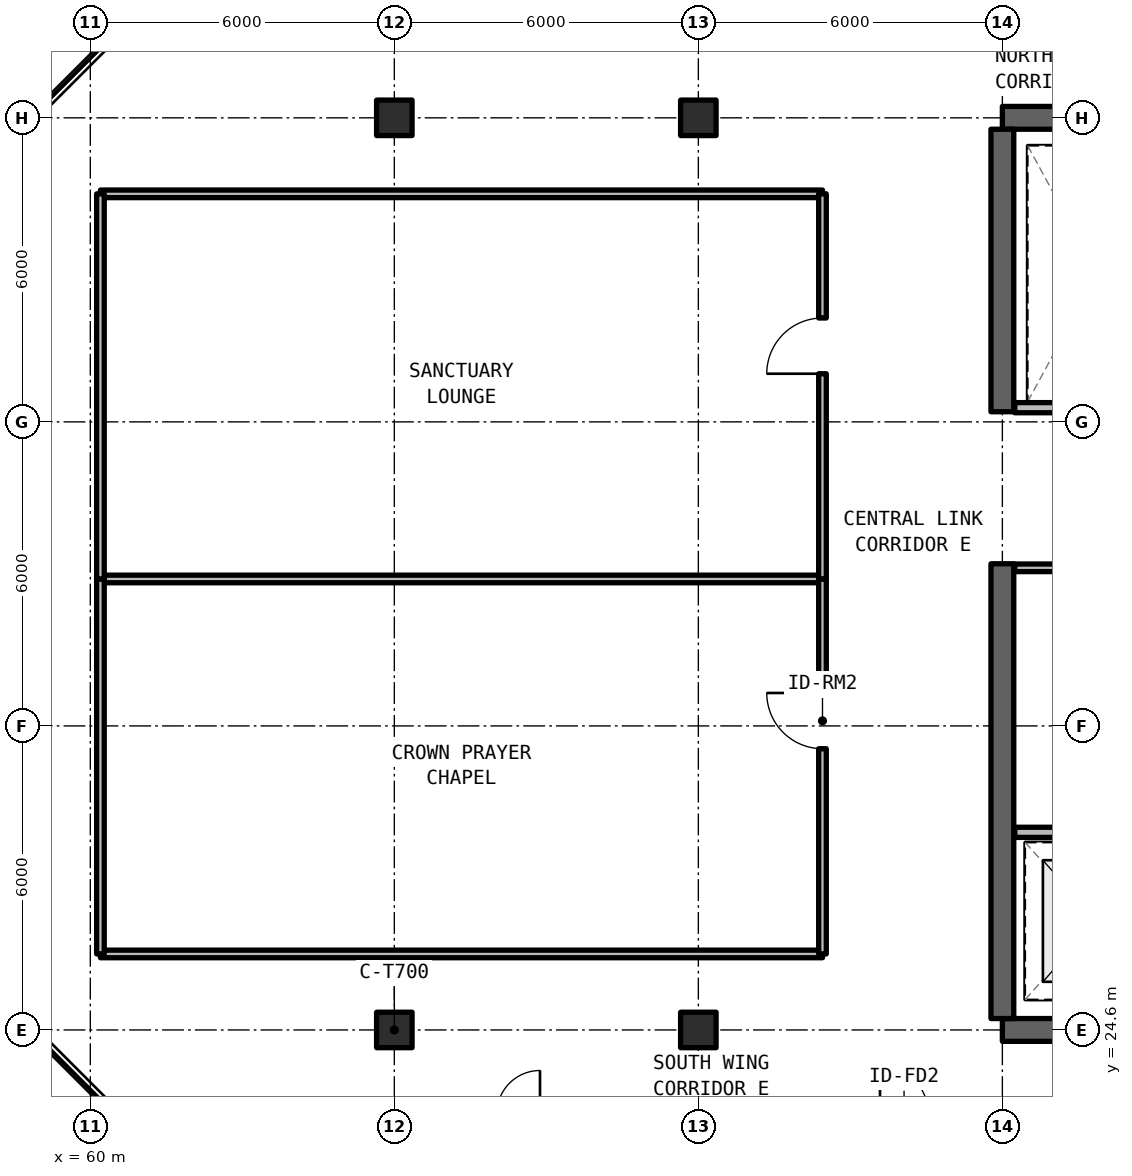
"""IFC4 building model, lengths in metres.
Left out: names, types, materials, properties, quantities, classifications, styles, units other than length and angle.
Written with IfcOpenShell. Run it as: python <this file> out.ifc"""

import sys

from ifc_helpers import new_model, si_unit, direction, frame, frame_2d, origin, origin_2d, place, context, subcontext, project, spatial, rectangle, extrude, element, fill, save


model = new_model("IFC4")
c1 = context("Model", 3, precision=1e-05, world=origin(), true_north=direction((0.0, 1.0)))
c2 = subcontext(c1, "Body", "Model", "MODEL_VIEW")
j1 = project(units=[si_unit("LENGTHUNIT", "METRE"), si_unit("PLANEANGLEUNIT", "RADIAN")], contexts=[c1])
p1 = place(None, origin())
s1 = spatial("IfcSite", under=j1, at=p1, CompositionType="ELEMENT")
p2 = place(p1, origin())
s2 = spatial("IfcBuilding", under=s1, at=p2, CompositionType="ELEMENT")
p3 = place(p2, frame((0.0, 0.0, 239.25)))
s3 = spatial("IfcBuildingStorey", under=s2, at=p3, CompositionType="ELEMENT", Elevation=239.25)
for number, where, z_axis, x_axis in (
    (1, (78.0, 24.6, 0.0), (0.0, 0.0, 1.0), (1.0, 0.0, 0.0)),
    (2, (90.0, 42.6, 0.0), (0.0, 0.0, 1.0), (-1.0, 0.0, 0.0)),
):
    element("IfcWall", number, at=place(p3, frame(where, z_axis=z_axis, x_axis=x_axis)), inside=s3, PredefinedType="SHEAR", context=c2, shape_type="SweptSolid", body=[
        extrude(rectangle(XDim=12.0, YDim=0.45, at=frame_2d((6.0, 0.0))), origin(), (0.0, 0.0, 1.0), 3.3),
    ])
p4 = place(p3, frame((78.0, 24.825, 0.0), z_axis=(0.0, 0.0, 1.0), x_axis=(0.0, 1.0, 0.0)))
e3 = element("IfcWall", 3, at=p4, inside=s3, PredefinedType="SHEAR", context=c2, shape_type="SweptSolid", body=[
    extrude(rectangle(XDim=8.975, YDim=0.45, at=frame_2d((4.488, 0.0))), origin(), (0.0, 0.0, 1.0), 3.3),
])
p5 = place(p3, frame((78.0, 36.8, 0.0), z_axis=(0.0, 0.0, 1.0), x_axis=(0.0, 1.0, 0.0)))
e4 = element("IfcWall", 4, at=p5, inside=s3, PredefinedType="SHEAR", context=c2, shape_type="SweptSolid", body=[
    extrude(rectangle(XDim=5.575, YDim=0.45, at=frame_2d((2.788, 0.0))), origin(), (0.0, 0.0, 1.0), 3.3),
])
for number, where, z_axis, x_axis in (
    (5, (66.0, 24.6, 0.0), (0.0, 0.0, 1.0), (1.0, 0.0, 0.0)),
    (6, (66.0, 42.6, 0.0), (0.0, 0.0, 1.0), (1.0, 0.0, 0.0)),
    (7, (72.0, 24.6, 0.0), (0.0, 0.0, 1.0), (1.0, 0.0, 0.0)),
    (8, (72.0, 42.6, 0.0), (0.0, 0.0, 1.0), (1.0, 0.0, 0.0)),
):
    element("IfcColumn", number, at=place(p3, frame(where, z_axis=z_axis, x_axis=x_axis)), inside=s3, PredefinedType="COLUMN", context=c2, shape_type="SweptSolid", body=[
        extrude(rectangle(XDim=0.7, YDim=0.7, at=origin_2d()), origin(), (0.0, 0.0, 1.0), 3.3),
    ])
p6 = place(p3, frame((78.245, 28.5, 0.0), z_axis=(0.0, 0.0, 1.0), x_axis=(1.0, 0.0, 0.0)))
e9 = element("IfcWall", 9, at=p6, inside=s3, PredefinedType="SOLIDWALL", context=c2, shape_type="SweptSolid", body=[
    extrude(rectangle(XDim=7.585, YDim=0.2, at=frame_2d((3.792, 0.0))), origin(), (0.0, 0.0, 1.0), 2.35),
])
p7 = place(p6, frame((3.555, 0.0, 0.0)))
e10 = element("IfcOpeningElement", 10, at=p7, cuts=e9, PredefinedType="OPENING", context=c2, shape_type="SweptSolid", body=[
    extrude(rectangle(XDim=1.0, YDim=2.15, at=frame_2d((0.5, 1.075))), frame((0.0, 0.11, 0.0), z_axis=(0.0, -1.0, 0.0), x_axis=(1.0, 0.0, 0.0)), (0.0, 0.0, 1.0), 0.22),
])
p8 = place(p3, frame((78.245, 33.72, 0.0), z_axis=(0.0, 0.0, 1.0), x_axis=(1.0, 0.0, 0.0)))
e11 = element("IfcWall", 11, at=p8, inside=s3, PredefinedType="SOLIDWALL", context=c2, shape_type="SweptSolid", body=[
    extrude(rectangle(XDim=3.075, YDim=0.15, at=frame_2d((1.538, 0.0))), origin(), (0.0, 0.0, 1.0), 2.35),
])
p9 = place(p3, frame((78.245, 36.88, 0.0), z_axis=(0.0, 0.0, 1.0), x_axis=(1.0, 0.0, 0.0)))
e12 = element("IfcWall", 12, at=p9, inside=s3, PredefinedType="SOLIDWALL", context=c2, shape_type="SweptSolid", body=[
    extrude(rectangle(XDim=3.075, YDim=0.2, at=frame_2d((1.538, 0.0))), origin(), (0.0, 0.0, 1.0), 2.35),
])
for number, where, z_axis, x_axis in (
    (13, (60.2, 26.1, 0.0), (0.0, 0.0, 1.0), (1.0, 0.0, 0.0)),
    (14, (60.2, 33.5, 0.0), (0.0, 0.0, 1.0), (1.0, 0.0, 0.0)),
):
    element("IfcWall", number, at=place(p3, frame(where, z_axis=z_axis, x_axis=x_axis)), inside=s3, PredefinedType="SOLIDWALL", context=c2, shape_type="SweptSolid", body=[
        extrude(rectangle(XDim=14.25, YDim=0.15, at=frame_2d((7.125, 0.0))), origin(), (0.0, 0.0, 1.0), 2.35),
    ])
p10 = place(p3, frame((60.2, 26.1, 0.0), z_axis=(0.0, 0.0, 1.0), x_axis=(0.0, 1.0, 0.0)))
e15 = element("IfcWall", 15, at=p10, inside=s3, PredefinedType="SOLIDWALL", context=c2, shape_type="SweptSolid", body=[
    extrude(rectangle(XDim=7.4, YDim=0.15, at=frame_2d((3.7, 0.0))), origin(), (0.0, 0.0, 1.0), 2.35),
])
p11 = place(p3, frame((74.45, 26.1, 0.0), z_axis=(0.0, 0.0, 1.0), x_axis=(0.0, 1.0, 0.0)))
e16 = element("IfcWall", 16, at=p11, inside=s3, PredefinedType="SOLIDWALL", context=c2, shape_type="SweptSolid", body=[
    extrude(rectangle(XDim=7.4, YDim=0.15, at=frame_2d((3.7, 0.0))), origin(), (0.0, 0.0, 1.0), 2.35),
])
p12 = place(p11, frame((4.05, 0.0, 0.0)))
e17 = element("IfcOpeningElement", 17, at=p12, cuts=e16, PredefinedType="OPENING", context=c2, shape_type="SweptSolid", body=[
    extrude(rectangle(XDim=1.1, YDim=2.15, at=frame_2d((0.55, 1.075))), frame((0.0, 0.085, 0.0), z_axis=(0.0, -1.0, 0.0), x_axis=(1.0, 0.0, 0.0)), (0.0, 0.0, 1.0), 0.17),
])
p13 = place(p3, frame((60.2, 41.1, 0.0), z_axis=(0.0, 0.0, 1.0), x_axis=(1.0, 0.0, 0.0)))
e18 = element("IfcWall", 18, at=p13, inside=s3, PredefinedType="SOLIDWALL", context=c2, shape_type="SweptSolid", body=[
    extrude(rectangle(XDim=14.25, YDim=0.15, at=frame_2d((7.125, 0.0))), origin(), (0.0, 0.0, 1.0), 2.35),
])
p14 = place(p3, frame((60.2, 33.5, 0.0), z_axis=(0.0, 0.0, 1.0), x_axis=(0.0, 1.0, 0.0)))
e19 = element("IfcWall", 19, at=p14, inside=s3, PredefinedType="SOLIDWALL", context=c2, shape_type="SweptSolid", body=[
    extrude(rectangle(XDim=7.6, YDim=0.15, at=frame_2d((3.8, 0.0))), origin(), (0.0, 0.0, 1.0), 2.35),
])
p15 = place(p3, frame((74.45, 33.5, 0.0), z_axis=(0.0, 0.0, 1.0), x_axis=(0.0, 1.0, 0.0)))
e20 = element("IfcWall", 20, at=p15, inside=s3, PredefinedType="SOLIDWALL", context=c2, shape_type="SweptSolid", body=[
    extrude(rectangle(XDim=7.6, YDim=0.15, at=frame_2d((3.8, 0.0))), origin(), (0.0, 0.0, 1.0), 2.35),
])
p16 = place(p15, frame((4.05, 0.0, 0.0)))
e21 = element("IfcOpeningElement", 21, at=p16, cuts=e20, PredefinedType="OPENING", context=c2, shape_type="SweptSolid", body=[
    extrude(rectangle(XDim=1.1, YDim=2.15, at=frame_2d((0.55, 1.075))), frame((0.0, 0.085, 0.0), z_axis=(0.0, -1.0, 0.0), x_axis=(1.0, 0.0, 0.0)), (0.0, 0.0, 1.0), 0.17),
])
p17 = place(p12, origin())
e22 = element("IfcDoor", 22, at=p17, inside=s3, OperationType="SINGLE_SWING_RIGHT", PredefinedType="DOOR", context=c2, shape_type="SweptSolid", body=[
    extrude(rectangle(XDim=1.1, YDim=2.15, at=frame_2d((0.55, 1.075))), frame((0.0, 0.025, 0.0), z_axis=(0.0, -1.0, 0.0), x_axis=(1.0, 0.0, 0.0)), (0.0, 0.0, 1.0), 0.05),
])
fill(e17, e22)
p18 = place(p16, origin())
e23 = element("IfcDoor", 23, at=p18, inside=s3, OperationType="SINGLE_SWING_LEFT", PredefinedType="DOOR", context=c2, shape_type="SweptSolid", body=[
    extrude(rectangle(XDim=1.1, YDim=2.15, at=frame_2d((0.55, 1.075))), frame((0.0, 0.025, 0.0), z_axis=(0.0, -1.0, 0.0), x_axis=(1.0, 0.0, 0.0)), (0.0, 0.0, 1.0), 0.05),
])
fill(e21, e23)
save(model, sys.argv[1])
